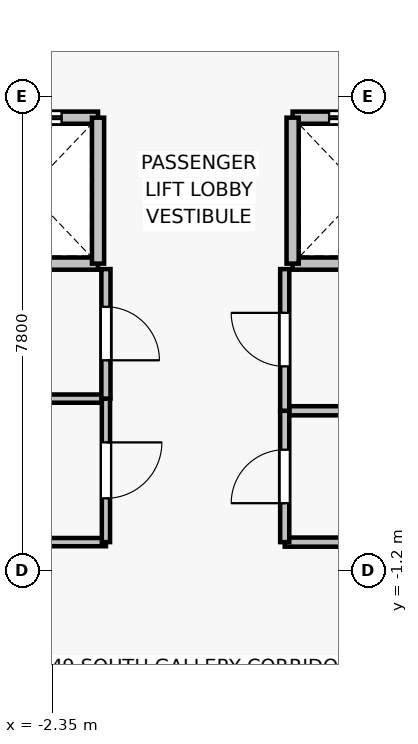
"""IFC4 building model, lengths in metres.
Left out: names, types, materials, properties, quantities, classifications, styles, units other than length and angle.
Written with IfcOpenShell. Run it as: python <this file> out.ifc"""

import sys

from ifc_helpers import new_model, si_unit, direction, frame, frame_2d, origin, place, context, subcontext, project, spatial, rectangle, extrude, source, transform, mapped, element, fill, save


model = new_model("IFC4")
c1 = context("Model", 3, precision=1e-05, world=origin(), true_north=direction((0.0, 1.0)))
c2 = subcontext(c1, "Body", "Model", "MODEL_VIEW")
j1 = project(units=[si_unit("LENGTHUNIT", "METRE"), si_unit("PLANEANGLEUNIT", "RADIAN")], contexts=[c1])
p1 = place(None, origin())
s1 = spatial("IfcSite", under=j1, at=p1, CompositionType="ELEMENT")
p2 = place(p1, origin())
s2 = spatial("IfcBuilding", under=s1, at=p2, CompositionType="ELEMENT")
p3 = place(p2, frame((0.0, 0.0, 175.9)))
s3 = spatial("IfcBuildingStorey", under=s2, at=p3, CompositionType="ELEMENT", Elevation=175.9)
p4 = place(p3, frame((-1.6, 3.85, 0.0), z_axis=(0.0, 0.0, 1.0), x_axis=(-1.0, 0.0, 0.0)))
e1 = element("IfcWall", 1, at=p4, inside=s3, PredefinedType="SOLIDWALL", context=c2, shape_type="SweptSolid", body=[
    extrude(rectangle(XDim=2.3, YDim=0.2, at=frame_2d((1.15, 0.0))), origin(), (0.0, 0.0, 1.0), 3.075),
])
p5 = place(p3, frame((-3.9, 6.25, 0.0), z_axis=(0.0, 0.0, 1.0), x_axis=(1.0, 0.0, 0.0)))
e2 = element("IfcWall", 2, at=p5, inside=s3, PredefinedType="SOLIDWALL", context=c2, shape_type="SweptSolid", body=[
    extrude(rectangle(XDim=2.3, YDim=0.2, at=frame_2d((1.15, 0.0))), origin(), (0.0, 0.0, 1.0), 3.075),
])
p6 = place(p5, frame((0.6, 0.0, 0.0)))
e3 = element("IfcOpeningElement", 3, at=p6, cuts=e2, PredefinedType="OPENING", context=c2, shape_type="SweptSolid", body=[
    extrude(rectangle(XDim=1.1, YDim=2.2, at=frame_2d((0.55, 1.1))), frame((0.0, 0.11, 0.0), z_axis=(0.0, -1.0, 0.0), x_axis=(1.0, 0.0, 0.0)), (0.0, 0.0, 1.0), 0.22),
])
p7 = place(p3, frame((-1.6, 6.25, 0.0), z_axis=(0.0, 0.0, 1.0), x_axis=(0.0, -1.0, 0.0)))
e4 = element("IfcWall", 4, at=p7, inside=s3, PredefinedType="SOLIDWALL", context=c2, shape_type="SweptSolid", body=[
    extrude(rectangle(XDim=2.4, YDim=0.2, at=frame_2d((1.2, 0.0))), origin(), (0.0, 0.0, 1.0), 3.075),
])
p8 = place(p3, frame((3.9, 3.85, 0.0), z_axis=(0.0, 0.0, 1.0), x_axis=(-1.0, 0.0, 0.0)))
e5 = element("IfcWall", 5, at=p8, inside=s3, PredefinedType="SOLIDWALL", context=c2, shape_type="SweptSolid", body=[
    extrude(rectangle(XDim=2.3, YDim=0.2, at=frame_2d((1.15, 0.0))), origin(), (0.0, 0.0, 1.0), 3.075),
])
p9 = place(p3, frame((1.6, 6.25, 0.0), z_axis=(0.0, 0.0, 1.0), x_axis=(1.0, 0.0, 0.0)))
e6 = element("IfcWall", 6, at=p9, inside=s3, PredefinedType="SOLIDWALL", context=c2, shape_type="SweptSolid", body=[
    extrude(rectangle(XDim=2.3, YDim=0.2, at=frame_2d((1.15, 0.0))), origin(), (0.0, 0.0, 1.0), 3.075),
])
p10 = place(p9, frame((0.6, 0.0, 0.0)))
e7 = element("IfcOpeningElement", 7, at=p10, cuts=e6, PredefinedType="OPENING", context=c2, shape_type="SweptSolid", body=[
    extrude(rectangle(XDim=1.1, YDim=2.2, at=frame_2d((0.55, 1.1))), frame((0.0, 0.11, 0.0), z_axis=(0.0, -1.0, 0.0), x_axis=(1.0, 0.0, 0.0)), (0.0, 0.0, 1.0), 0.22),
])
p11 = place(p3, frame((1.6, 3.85, 0.0), z_axis=(0.0, 0.0, 1.0), x_axis=(0.0, 1.0, 0.0)))
e8 = element("IfcWall", 8, at=p11, inside=s3, PredefinedType="SOLIDWALL", context=c2, shape_type="SweptSolid", body=[
    extrude(rectangle(XDim=2.4, YDim=0.2, at=frame_2d((1.2, 0.0))), origin(), (0.0, 0.0, 1.0), 3.075),
])
for number, where, z_axis, x_axis in (
    (9, (-1.47, -0.73, 0.0), (0.0, 0.0, 1.0), (-1.0, 0.0, 0.0)),
    (10, (-3.47, 1.63, 0.0), (0.0, 0.0, 1.0), (1.0, 0.0, 0.0)),
):
    element("IfcWall", number, at=place(p3, frame(where, z_axis=z_axis, x_axis=x_axis)), inside=s3, PredefinedType="PARTITIONING", context=c2, shape_type="SweptSolid", body=[
        extrude(rectangle(XDim=2.0, YDim=0.135, at=frame_2d((1.0, 0.0))), origin(), (0.0, 0.0, 1.0), 3.075),
    ])
p12 = place(p3, frame((-1.47, 1.63, 0.0), z_axis=(0.0, 0.0, 1.0), x_axis=(0.0, -1.0, 0.0)))
e11 = element("IfcWall", 11, at=p12, inside=s3, PredefinedType="PARTITIONING", context=c2, shape_type="SweptSolid", body=[
    extrude(rectangle(XDim=2.36, YDim=0.135, at=frame_2d((1.18, 0.0))), origin(), (0.0, 0.0, 1.0), 3.075),
])
p13 = place(p12, frame((0.72, 0.0, 0.0)))
e12 = element("IfcOpeningElement", 12, at=p13, cuts=e11, PredefinedType="OPENING", context=c2, shape_type="SweptSolid", body=[
    extrude(rectangle(XDim=0.92, YDim=2.1, at=frame_2d((0.46, 1.05))), frame((0.0, 0.077, 0.0), z_axis=(0.0, -1.0, 0.0), x_axis=(1.0, 0.0, 0.0)), (0.0, 0.0, 1.0), 0.155),
])
p14 = place(p3, frame((-1.47, 3.76, 0.0), z_axis=(0.0, 0.0, 1.0), x_axis=(0.0, -1.0, 0.0)))
e13 = element("IfcWall", 13, at=p14, inside=s3, PredefinedType="PARTITIONING", context=c2, shape_type="SweptSolid", body=[
    extrude(rectangle(XDim=2.13, YDim=0.15, at=frame_2d((1.065, 0.0))), origin(), (0.0, 0.0, 1.0), 3.075),
])
p15 = place(p14, frame((0.62, 0.0, 0.0)))
e14 = element("IfcOpeningElement", 14, at=p15, cuts=e13, PredefinedType="OPENING", context=c2, shape_type="SweptSolid", body=[
    extrude(rectangle(XDim=0.88, YDim=2.1, at=frame_2d((0.44, 1.05))), frame((0.0, 0.085, 0.0), z_axis=(0.0, -1.0, 0.0), x_axis=(1.0, 0.0, 0.0)), (0.0, 0.0, 1.0), 0.17),
])
for number, where, z_axis, x_axis in (
    (15, (3.68, -0.73, 0.0), (0.0, 0.0, 1.0), (-1.0, 0.0, 0.0)),
    (16, (1.47, 1.43, 0.0), (0.0, 0.0, 1.0), (1.0, 0.0, 0.0)),
):
    element("IfcWall", number, at=place(p3, frame(where, z_axis=z_axis, x_axis=x_axis)), inside=s3, PredefinedType="PARTITIONING", context=c2, shape_type="SweptSolid", body=[
        extrude(rectangle(XDim=2.21, YDim=0.15, at=frame_2d((1.105, 0.0))), origin(), (0.0, 0.0, 1.0), 3.075),
    ])
p16 = place(p3, frame((1.47, -0.73, 0.0), z_axis=(0.0, 0.0, 1.0), x_axis=(0.0, 1.0, 0.0)))
e17 = element("IfcWall", 17, at=p16, inside=s3, PredefinedType="PARTITIONING", context=c2, shape_type="SweptSolid", body=[
    extrude(rectangle(XDim=2.16, YDim=0.15, at=frame_2d((1.08, 0.0))), origin(), (0.0, 0.0, 1.0), 3.075),
])
p17 = place(p16, frame((0.64, 0.0, 0.0)))
e18 = element("IfcOpeningElement", 18, at=p17, cuts=e17, PredefinedType="OPENING", context=c2, shape_type="SweptSolid", body=[
    extrude(rectangle(XDim=0.88, YDim=2.1, at=frame_2d((0.44, 1.05))), frame((0.0, 0.085, 0.0), z_axis=(0.0, -1.0, 0.0), x_axis=(1.0, 0.0, 0.0)), (0.0, 0.0, 1.0), 0.17),
])
p18 = place(p3, frame((1.47, 1.43, 0.0), z_axis=(0.0, 0.0, 1.0), x_axis=(0.0, 1.0, 0.0)))
e19 = element("IfcWall", 19, at=p18, inside=s3, PredefinedType="PARTITIONING", context=c2, shape_type="SweptSolid", body=[
    extrude(rectangle(XDim=2.33, YDim=0.15, at=frame_2d((1.165, 0.0))), origin(), (0.0, 0.0, 1.0), 3.075),
])
p19 = place(p18, frame((0.73, 0.0, 0.0)))
e20 = element("IfcOpeningElement", 20, at=p19, cuts=e19, PredefinedType="OPENING", context=c2, shape_type="SweptSolid", body=[
    extrude(rectangle(XDim=0.88, YDim=2.15, at=frame_2d((0.44, 1.075))), frame((0.0, 0.085, 0.0), z_axis=(0.0, -1.0, 0.0), x_axis=(1.0, 0.0, 0.0)), (0.0, 0.0, 1.0), 0.17),
])
m1 = source(origin(), c2, "Body", "SweptSolid", [
    extrude(rectangle(XDim=1.1, YDim=2.2, at=frame_2d((0.55, 1.1))), frame((0.0, 0.025, 0.0), z_axis=(0.0, -1.0, 0.0), x_axis=(1.0, 0.0, 0.0)), (0.0, 0.0, 1.0), 0.05),
])
p20 = place(p6, origin())
e21 = element("IfcDoor", 21, at=p20, inside=s3, OperationType="DOUBLE_DOOR_SLIDING", PredefinedType="DOOR", context=c2, shape_type="MappedRepresentation", body=[
    mapped(m1, transform((0.0, 0.0, 0.0), x_axis=(1.0, 0.0, 0.0), y_axis=(0.0, 1.0, 0.0), z_axis=(0.0, 0.0, 1.0), scale=1.0)),
])
fill(e3, e21)
p21 = place(p10, origin())
e22 = element("IfcDoor", 22, at=p21, inside=s3, OperationType="DOUBLE_DOOR_SLIDING", PredefinedType="DOOR", context=c2, shape_type="MappedRepresentation", body=[
    mapped(m1, transform((0.0, 0.0, 0.0), x_axis=(1.0, 0.0, 0.0), y_axis=(0.0, 1.0, 0.0), z_axis=(0.0, 0.0, 1.0), scale=1.0)),
])
fill(e7, e22)
m2 = source(origin(), c2, "Body", "SweptSolid", [
    extrude(rectangle(XDim=0.92, YDim=2.1, at=frame_2d((0.46, 1.05))), frame((0.0, 0.025, 0.0), z_axis=(0.0, -1.0, 0.0), x_axis=(1.0, 0.0, 0.0)), (0.0, 0.0, 1.0), 0.05),
])
p22 = place(p13, origin())
e23 = element("IfcDoor", 23, at=p22, inside=s3, OperationType="SINGLE_SWING_LEFT", PredefinedType="DOOR", context=c2, shape_type="MappedRepresentation", body=[
    mapped(m2, transform((0.0, 0.0, 0.0), x_axis=(1.0, 0.0, 0.0), y_axis=(0.0, 1.0, 0.0), z_axis=(0.0, 0.0, 1.0), scale=1.0)),
])
fill(e12, e23)
m3 = source(origin(), c2, "Body", "SweptSolid", [
    extrude(rectangle(XDim=0.88, YDim=2.1, at=frame_2d((0.44, 1.05))), frame((0.0, 0.025, 0.0), z_axis=(0.0, -1.0, 0.0), x_axis=(1.0, 0.0, 0.0)), (0.0, 0.0, 1.0), 0.05),
])
p23 = place(p15, origin())
e24 = element("IfcDoor", 24, at=p23, inside=s3, OperationType="SINGLE_SWING_RIGHT", PredefinedType="DOOR", context=c2, shape_type="MappedRepresentation", body=[
    mapped(m3, transform((0.0, 0.0, 0.0), x_axis=(1.0, 0.0, 0.0), y_axis=(0.0, 1.0, 0.0), z_axis=(0.0, 0.0, 1.0), scale=1.0)),
])
fill(e14, e24)
p24 = place(p17, origin())
e25 = element("IfcDoor", 25, at=p24, inside=s3, OperationType="SINGLE_SWING_LEFT", PredefinedType="DOOR", context=c2, shape_type="MappedRepresentation", body=[
    mapped(m3, transform((0.0, 0.0, 0.0), x_axis=(1.0, 0.0, 0.0), y_axis=(0.0, 1.0, 0.0), z_axis=(0.0, 0.0, 1.0), scale=1.0)),
])
fill(e18, e25)
m4 = source(origin(), c2, "Body", "SweptSolid", [
    extrude(rectangle(XDim=0.88, YDim=2.15, at=frame_2d((0.44, 1.075))), frame((0.0, 0.025, 0.0), z_axis=(0.0, -1.0, 0.0), x_axis=(1.0, 0.0, 0.0)), (0.0, 0.0, 1.0), 0.05),
])
p25 = place(p19, origin())
e26 = element("IfcDoor", 26, at=p25, inside=s3, OperationType="SINGLE_SWING_RIGHT", PredefinedType="DOOR", context=c2, shape_type="MappedRepresentation", body=[
    mapped(m4, transform((0.0, 0.0, 0.0), x_axis=(1.0, 0.0, 0.0), y_axis=(0.0, 1.0, 0.0), z_axis=(0.0, 0.0, 1.0), scale=1.0)),
])
fill(e20, e26)
save(model, sys.argv[1])
